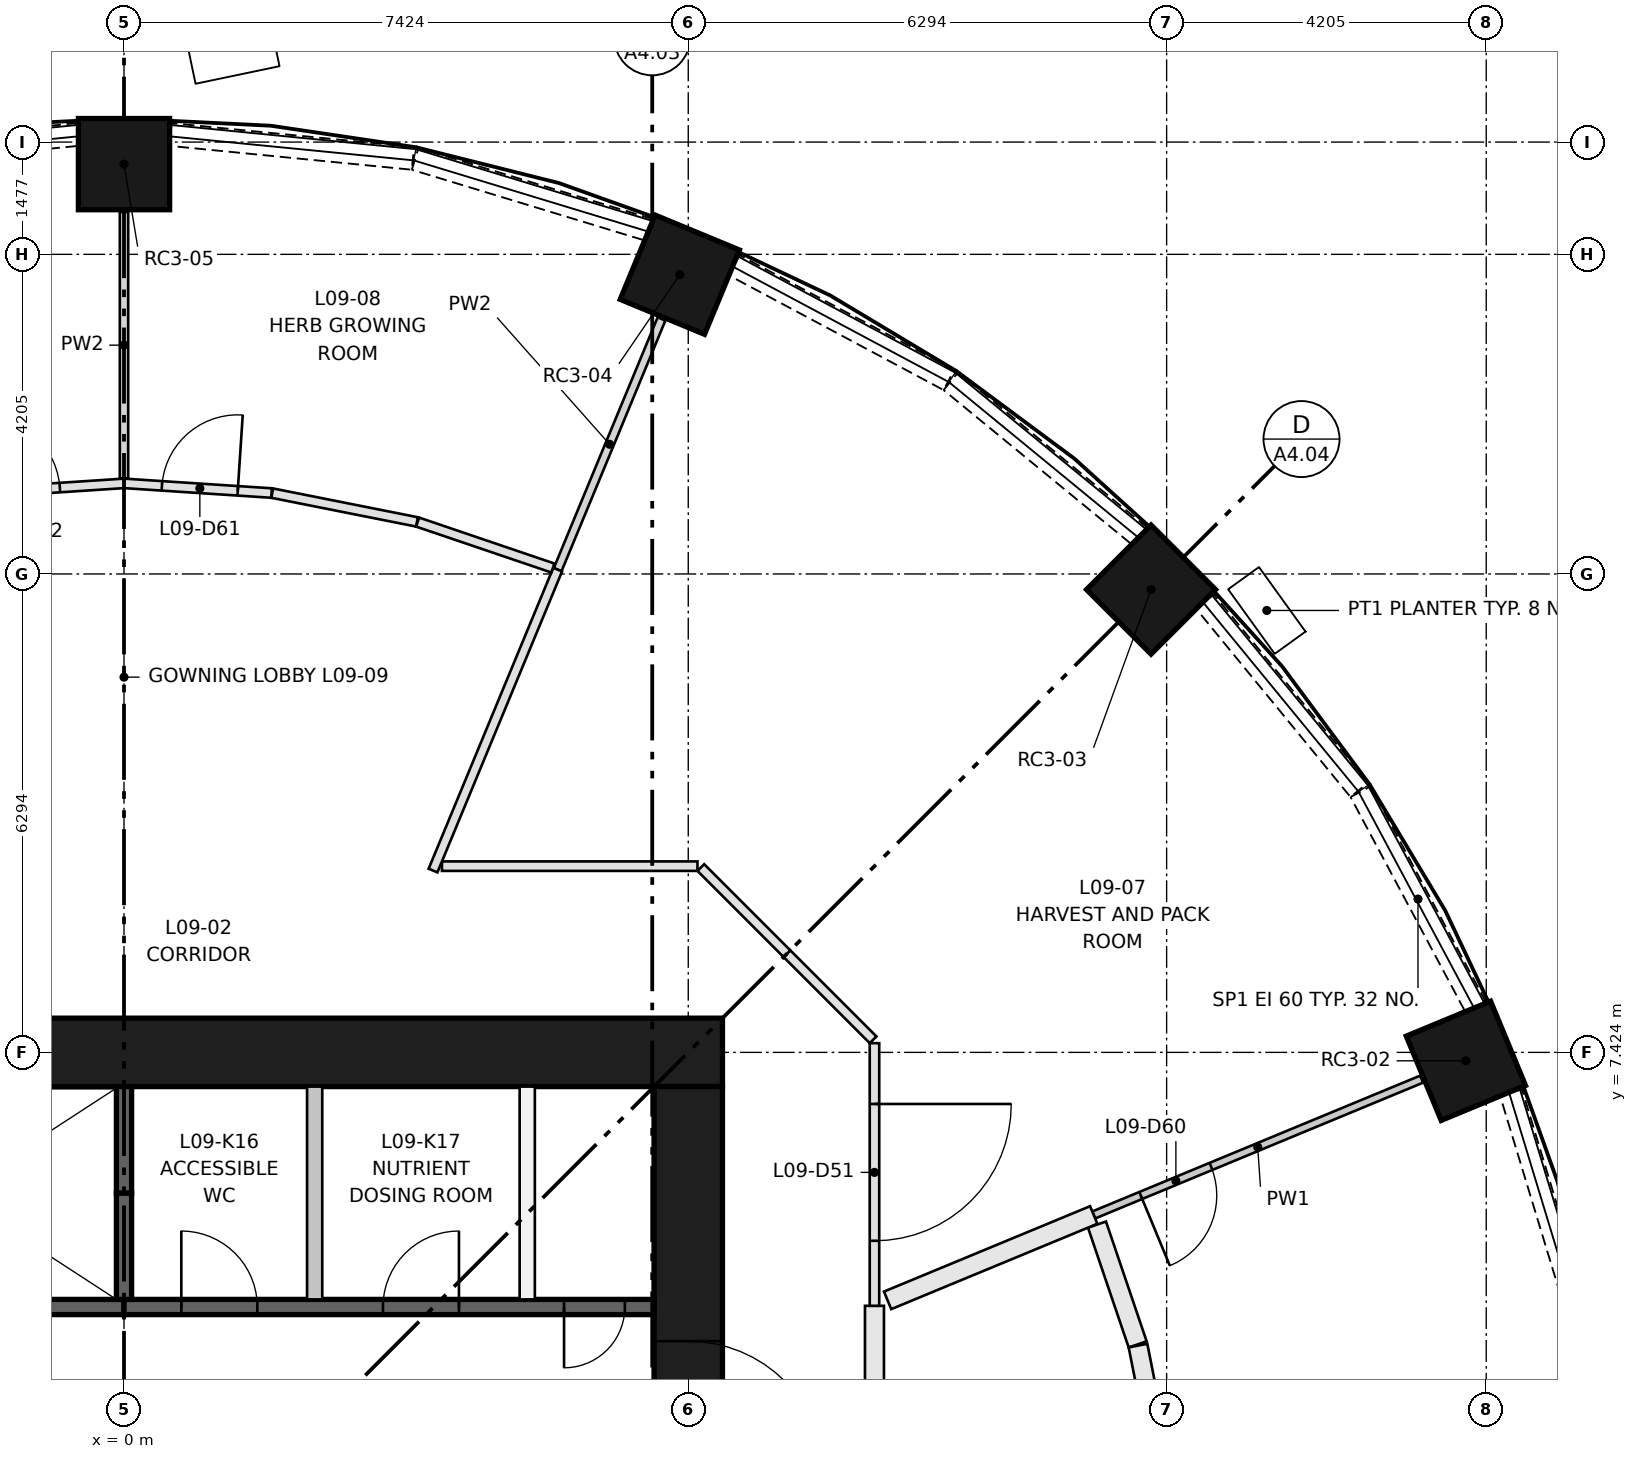
"""IFC4 building model, lengths in metres.
Left out: names, types, materials, properties, quantities, classifications, styles, units other than length and angle.
Written with IfcOpenShell. Run it as: python <this file> out.ifc"""

import sys

from ifc_helpers import new_model, si_unit, direction, frame, frame_2d, origin, origin_2d, place, context, subcontext, project, spatial, rectangle, extrude, element, fill, save


model = new_model("IFC4")
c1 = context("Model", 3, precision=1e-05, world=origin(), true_north=direction((0.0, 1.0)))
c2 = subcontext(c1, "Body", "Model", "MODEL_VIEW")
j1 = project(units=[si_unit("LENGTHUNIT", "METRE"), si_unit("PLANEANGLEUNIT", "RADIAN")], contexts=[c1])
p1 = place(None, origin())
s1 = spatial("IfcSite", under=j1, at=p1, CompositionType="ELEMENT")
p2 = place(p1, origin())
s2 = spatial("IfcBuilding", under=s1, at=p2, CompositionType="ELEMENT")
p3 = place(p2, frame((0.0, 0.0, 37.15)))
s3 = spatial("IfcBuildingStorey", under=s2, at=p3, CompositionType="ELEMENT", Elevation=37.15)
for number, where, z_axis, x_axis in (
    (1, (17.655, 7.313, 0.0), (0.0, 0.0, 1.0), (0.924, 0.383, 0.0)),
    (2, (13.513, 13.513, 0.0), (0.0, 0.0, 1.0), (0.707, 0.707, 0.0)),
    (3, (7.313, 17.655, 0.0), (0.0, 0.0, 1.0), (0.383, 0.924, 0.0)),
    (4, (0.0, 19.11, 0.0), (0.0, 0.0, 1.0), (0.0, 1.0, 0.0)),
):
    element("IfcColumn", number, at=place(p3, frame(where, z_axis=z_axis, x_axis=x_axis)), inside=s3, PredefinedType="COLUMN", context=c2, shape_type="SweptSolid", body=[
        extrude(rectangle(XDim=1.2, YDim=1.2, at=origin_2d()), origin(), (0.0, 0.0, 1.0), 3.65),
    ])
p4 = place(p3, frame((-7.874, 7.424, 0.0), z_axis=(0.0, 0.0, 1.0), x_axis=(1.0, 0.0, 0.0)))
e5 = element("IfcWall", 5, at=p4, inside=s3, PredefinedType="SHEAR", context=c2, shape_type="SweptSolid", body=[
    extrude(rectangle(XDim=15.748, YDim=0.9, at=frame_2d((7.874, 0.0))), origin(), (0.0, 0.0, 1.0), 3.65),
])
p5 = place(p3, frame((7.424, -6.974, 0.0), z_axis=(0.0, 0.0, 1.0), x_axis=(0.0, 1.0, 0.0)))
e6 = element("IfcWall", 6, at=p5, inside=s3, PredefinedType="SHEAR", context=c2, shape_type="SweptSolid", body=[
    extrude(rectangle(XDim=13.948, YDim=0.9, at=frame_2d((6.974, 0.0))), origin(), (0.0, 0.0, 1.0), 3.65),
])
p6 = place(p5, frame((6.474, 0.0, 0.0)))
e7 = element("IfcOpeningElement", 7, at=p6, cuts=e6, PredefinedType="OPENING", context=c2, shape_type="SweptSolid", body=[
    extrude(rectangle(XDim=1.0, YDim=2.1, at=frame_2d((0.5, 1.05))), frame((0.0, 0.46, 0.0), z_axis=(0.0, -1.0, 0.0), x_axis=(1.0, 0.0, 0.0)), (0.0, 0.0, 1.0), 0.92),
])
p7 = place(p5, frame((3.35, 0.0, 0.0)))
e8 = element("IfcOpeningElement", 8, at=p7, cuts=e6, PredefinedType="OPENING", context=c2, shape_type="SweptSolid", body=[
    extrude(rectangle(XDim=1.8, YDim=2.1, at=frame_2d((0.9, 1.05))), frame((0.0, 0.46, 0.0), z_axis=(0.0, -1.0, 0.0), x_axis=(1.0, 0.0, 0.0)), (0.0, 0.0, 1.0), 0.92),
])
p8 = place(p5, frame((8.799, 0.0, 0.0)))
e9 = element("IfcOpeningElement", 9, at=p8, cuts=e6, PredefinedType="OPENING", context=c2, shape_type="SweptSolid", body=[
    extrude(rectangle(XDim=1.8, YDim=2.1, at=frame_2d((0.9, 1.05))), frame((0.0, 0.46, 0.0), z_axis=(0.0, -1.0, 0.0), x_axis=(1.0, 0.0, 0.0)), (0.0, 0.0, 1.0), 0.92),
])
p9 = place(p3, frame((-6.974, 4.074, 0.0), z_axis=(0.0, 0.0, 1.0), x_axis=(1.0, 0.0, 0.0)))
e10 = element("IfcWall", 10, at=p9, inside=s3, PredefinedType="SHEAR", context=c2, shape_type="SweptSolid", body=[
    extrude(rectangle(XDim=6.974, YDim=0.2, at=frame_2d((3.487, 0.0))), origin(), (0.0, 0.0, 1.0), 3.3),
])
p10 = place(p3, frame((0.0, 4.074, 0.0), z_axis=(0.0, 0.0, 1.0), x_axis=(1.0, 0.0, 0.0)))
e11 = element("IfcWall", 11, at=p10, inside=s3, PredefinedType="SHEAR", context=c2, shape_type="SweptSolid", body=[
    extrude(rectangle(XDim=6.974, YDim=0.2, at=frame_2d((3.487, 0.0))), origin(), (0.0, 0.0, 1.0), 3.3),
])
p11 = place(p10, frame((0.754, 0.0, 0.0)))
e12 = element("IfcOpeningElement", 12, at=p11, cuts=e11, PredefinedType="OPENING", context=c2, shape_type="SweptSolid", body=[
    extrude(rectangle(XDim=1.0, YDim=2.1, at=frame_2d((0.5, 1.05))), frame((0.0, 0.11, 0.0), z_axis=(0.0, -1.0, 0.0), x_axis=(1.0, 0.0, 0.0)), (0.0, 0.0, 1.0), 0.22),
])
p12 = place(p10, frame((3.407, 0.0, 0.0)))
e13 = element("IfcOpeningElement", 13, at=p12, cuts=e11, PredefinedType="OPENING", context=c2, shape_type="SweptSolid", body=[
    extrude(rectangle(XDim=1.0, YDim=2.1, at=frame_2d((0.5, 1.05))), frame((0.0, 0.11, 0.0), z_axis=(0.0, -1.0, 0.0), x_axis=(1.0, 0.0, 0.0)), (0.0, 0.0, 1.0), 0.22),
])
p13 = place(p10, frame((5.79, 0.0, 0.0)))
e14 = element("IfcOpeningElement", 14, at=p13, cuts=e11, PredefinedType="OPENING", context=c2, shape_type="SweptSolid", body=[
    extrude(rectangle(XDim=0.8, YDim=2.1, at=frame_2d((0.4, 1.05))), frame((0.0, 0.11, 0.0), z_axis=(0.0, -1.0, 0.0), x_axis=(1.0, 0.0, 0.0)), (0.0, 0.0, 1.0), 0.22),
])
p14 = place(p3, frame((0.0, 4.174, 0.0), z_axis=(0.0, 0.0, 1.0), x_axis=(0.0, 1.0, 0.0)))
e15 = element("IfcWall", 15, at=p14, inside=s3, PredefinedType="SHEAR", context=c2, shape_type="SweptSolid", body=[
    extrude(rectangle(XDim=1.4, YDim=0.2, at=frame_2d((0.7, 0.0))), origin(), (0.0, 0.0, 1.0), 3.3),
])
p15 = place(p3, frame((0.0, 5.574, 0.0), z_axis=(0.0, 0.0, 1.0), x_axis=(0.0, 1.0, 0.0)))
e16 = element("IfcWall", 16, at=p15, inside=s3, PredefinedType="SHEAR", context=c2, shape_type="SweptSolid", body=[
    extrude(rectangle(XDim=1.4, YDim=0.2, at=frame_2d((0.7, 0.0))), origin(), (0.0, 0.0, 1.0), 3.3),
])
for number, where, z_axis, x_axis in (
    (17, (2.509, 4.174, 0.0), (0.0, 0.0, 1.0), (0.0, 1.0, 0.0)),
    (18, (5.305, 4.174, 0.0), (0.0, 0.0, 1.0), (0.0, 1.0, 0.0)),
):
    element("IfcWall", number, at=place(p3, frame(where, z_axis=z_axis, x_axis=x_axis)), inside=s3, PredefinedType="PARTITIONING", context=c2, shape_type="SweptSolid", body=[
        extrude(rectangle(XDim=2.8, YDim=0.2, at=frame_2d((1.4, 0.0))), origin(), (0.0, 0.0, 1.0), 3.3),
    ])
p16 = place(p3, frame((19.18, 3.83, 0.0), z_axis=(0.0, 0.0, 1.0), x_axis=(-0.290472877795, 0.956883225512, 0.0)))
e19 = element("IfcWall", 19, at=p16, inside=s3, PredefinedType="SOLIDWALL", context=c2, shape_type="SweptSolid", body=[
    extrude(rectangle(XDim=3.202, YDim=0.3, at=frame_2d((1.601, 0.0))), origin(), (0.0, 0.0, 1.0), 0.9),
])
p17 = place(p3, frame((17.78, 8.028, 0.0), z_axis=(0.0, 0.0, 1.0), x_axis=(-0.471284265614, 0.881981372243, 0.0)))
e20 = element("IfcWall", 20, at=p17, inside=s3, PredefinedType="SOLIDWALL", context=c2, shape_type="SweptSolid", body=[
    extrude(rectangle(XDim=3.204, YDim=0.3, at=frame_2d((1.602, 0.0))), origin(), (0.0, 0.0, 1.0), 0.9),
])
for number, where, z_axis, x_axis in (
    (21, (16.253, 10.879, 0.0), (0.0, 0.0, 1.0), (-0.634, 0.773, 0.0)),
    (22, (13.354, 14.222, 0.0), (0.0, 0.0, 1.0), (-0.773, 0.634, 0.0)),
):
    element("IfcWall", number, at=place(p3, frame(where, z_axis=z_axis, x_axis=x_axis)), inside=s3, PredefinedType="SOLIDWALL", context=c2, shape_type="SweptSolid", body=[
        extrude(rectangle(XDim=3.202, YDim=0.3, at=frame_2d((1.601, 0.0))), origin(), (0.0, 0.0, 1.0), 0.9),
    ])
p18 = place(p3, frame((10.854, 16.27, 0.0), z_axis=(0.0, 0.0, 1.0), x_axis=(-0.881981372243, 0.471284265614, 0.0)))
e23 = element("IfcWall", 23, at=p18, inside=s3, PredefinedType="SOLIDWALL", context=c2, shape_type="SweptSolid", body=[
    extrude(rectangle(XDim=3.204, YDim=0.3, at=frame_2d((1.602, 0.0))), origin(), (0.0, 0.0, 1.0), 0.9),
])
p19 = place(p3, frame((6.895, 18.25, 0.0), z_axis=(0.0, 0.0, 1.0), x_axis=(-0.956883225512, 0.290472877795, 0.0)))
e24 = element("IfcWall", 24, at=p19, inside=s3, PredefinedType="SOLIDWALL", context=c2, shape_type="SweptSolid", body=[
    extrude(rectangle(XDim=3.202, YDim=0.3, at=frame_2d((1.601, 0.0))), origin(), (0.0, 0.0, 1.0), 0.9),
])
for number, where, z_axis, x_axis in (
    (25, (3.801, 19.186, 0.0), (0.0, 0.0, 1.0), (-0.995, 0.098, 0.0)),
    (26, (-0.613, 19.5, 0.0), (0.0, 0.0, 1.0), (-0.995, -0.098, 0.0)),
):
    element("IfcWall", number, at=place(p3, frame(where, z_axis=z_axis, x_axis=x_axis)), inside=s3, PredefinedType="SOLIDWALL", context=c2, shape_type="SweptSolid", body=[
        extrude(rectangle(XDim=3.204, YDim=0.3, at=frame_2d((1.602, 0.0))), origin(), (0.0, 0.0, 1.0), 0.9),
    ])
p20 = place(p3, frame((9.874, 4.09, 0.0), z_axis=(0.0, 0.0, 1.0), x_axis=(0.0, -1.0, 0.0)))
e27 = element("IfcWall", 27, at=p20, inside=s3, PredefinedType="PARTITIONING", context=c2, shape_type="SweptSolid", body=[
    extrude(rectangle(XDim=4.09, YDim=0.25, at=frame_2d((2.045, 0.0))), origin(), (0.0, 0.0, 1.0), 3.3),
])
p21 = place(p20, frame((1.5, 0.0, 0.0)))
e28 = element("IfcOpeningElement", 28, at=p21, cuts=e27, PredefinedType="OPENING", context=c2, shape_type="SweptSolid", body=[
    extrude(rectangle(XDim=1.0, YDim=2.1, at=frame_2d((0.5, 1.05))), frame((0.0, 0.135, 0.0), z_axis=(0.0, -1.0, 0.0), x_axis=(1.0, 0.0, 0.0)), (0.0, 0.0, 1.0), 0.27),
])
p22 = place(p3, frame((8.722, 8.722, 0.0), z_axis=(0.0, 0.0, 1.0), x_axis=(0.70718294931, -0.707030604857, 0.0)))
e29 = element("IfcWall", 29, at=p22, inside=s3, PredefinedType="PARTITIONING", context=c2, shape_type="SweptSolid", body=[
    extrude(rectangle(XDim=1.603, YDim=0.125, at=frame_2d((0.801, 0.0))), origin(), (0.0, 0.0, 1.0), 3.3),
])
p23 = place(p3, frame((9.874, 7.545, 0.0), z_axis=(0.0, 0.0, 1.0), x_axis=(0.0, -1.0, 0.0)))
e30 = element("IfcWall", 30, at=p23, inside=s3, PredefinedType="PARTITIONING", context=c2, shape_type="SweptSolid", body=[
    extrude(rectangle(XDim=3.455, YDim=0.125, at=frame_2d((1.728, 0.0))), origin(), (0.0, 0.0, 1.0), 3.3),
])
p24 = place(p23, frame((0.8, 0.0, 0.0)))
e31 = element("IfcOpeningElement", 31, at=p24, cuts=e30, PredefinedType="OPENING", context=c2, shape_type="SweptSolid", body=[
    extrude(rectangle(XDim=1.8, YDim=2.1, at=frame_2d((0.9, 1.05))), frame((0.0, 0.073, 0.0), z_axis=(0.0, -1.0, 0.0), x_axis=(1.0, 0.0, 0.0)), (0.0, 0.0, 1.0), 0.145),
])
p25 = place(p3, frame((4.183, 9.874, 0.0), z_axis=(0.0, 0.0, 1.0), x_axis=(1.0, 0.0, 0.0)))
e32 = element("IfcWall", 32, at=p25, inside=s3, PredefinedType="PARTITIONING", context=c2, shape_type="SweptSolid", body=[
    extrude(rectangle(XDim=3.362, YDim=0.125, at=frame_2d((1.681, 0.0))), origin(), (0.0, 0.0, 1.0), 3.3),
])
p26 = place(p3, frame((7.589, 9.856, 0.0), z_axis=(0.0, 0.0, 1.0), x_axis=(0.707030604857, -0.70718294931, 0.0)))
e33 = element("IfcWall", 33, at=p26, inside=s3, PredefinedType="PARTITIONING", context=c2, shape_type="SweptSolid", body=[
    extrude(rectangle(XDim=1.603, YDim=0.125, at=frame_2d((0.801, 0.0))), origin(), (0.0, 0.0, 1.0), 3.3),
])
p27 = place(p3, frame((13.337, 3.582, 0.0), z_axis=(0.0, 0.0, 1.0), x_axis=(-0.321458381335, 0.946923708157, 0.0)))
e34 = element("IfcWall", 34, at=p27, inside=s3, PredefinedType="PARTITIONING", context=c2, shape_type="SweptSolid", body=[
    extrude(rectangle(XDim=1.665, YDim=0.25, at=frame_2d((0.833, 0.0))), origin(), (0.0, 0.0, 1.0), 3.3),
])
p28 = place(p3, frame((13.69, 1.811, 0.0), z_axis=(0.0, 0.0, 1.0), x_axis=(-0.195014530736, 0.980800353182, 0.0)))
e35 = element("IfcWall", 35, at=p28, inside=s3, PredefinedType="PARTITIONING", context=c2, shape_type="SweptSolid", body=[
    extrude(rectangle(XDim=1.79, YDim=0.25, at=frame_2d((0.895, 0.0))), origin(), (0.0, 0.0, 1.0), 3.3),
])
p29 = place(p3, frame((17.073, 7.072, 0.0), z_axis=(0.0, 0.0, 1.0), x_axis=(-0.92387920118, -0.382684232268, 0.0)))
e36 = element("IfcWall", 36, at=p29, inside=s3, PredefinedType="PARTITIONING", context=c2, shape_type="SweptSolid", body=[
    extrude(rectangle(XDim=4.67, YDim=0.1, at=frame_2d((2.335, 0.0))), origin(), (0.0, 0.0, 1.0), 3.3),
])
p30 = place(p29, frame((3.0, 0.0, 0.0)))
e37 = element("IfcOpeningElement", 37, at=p30, cuts=e36, PredefinedType="OPENING", context=c2, shape_type="SweptSolid", body=[
    extrude(rectangle(XDim=1.0, YDim=2.1, at=frame_2d((0.5, 1.05))), frame((0.0, 0.06, 0.0), z_axis=(0.0, -1.0, 0.0), x_axis=(1.0, 0.0, 0.0)), (0.0, 0.0, 1.0), 0.12),
])
p31 = place(p3, frame((10.047, 4.162, 0.0), z_axis=(0.0, 0.0, 1.0), x_axis=(0.92388200997, 0.382677451195, 0.0)))
e38 = element("IfcWall", 38, at=p31, inside=s3, PredefinedType="PARTITIONING", context=c2, shape_type="SweptSolid", body=[
    extrude(rectangle(XDim=2.935, YDim=0.25, at=frame_2d((1.468, 0.0))), origin(), (0.0, 0.0, 1.0), 3.3),
])
p32 = place(p3, frame((5.706, 13.775, 0.0), z_axis=(0.0, 0.0, 1.0), x_axis=(0.382706138858, 0.923870126847, 0.0)))
e39 = element("IfcWall", 39, at=p32, inside=s3, PredefinedType="PARTITIONING", context=c2, shape_type="SweptSolid", body=[
    extrude(rectangle(XDim=3.57, YDim=0.11, at=frame_2d((1.785, 0.0))), origin(), (0.0, 0.0, 1.0), 3.3),
])
p33 = place(p3, frame((4.066, 9.816, 0.0), z_axis=(0.0, 0.0, 1.0), x_axis=(0.382709065586, 0.923868914467, 0.0)))
e40 = element("IfcWall", 40, at=p33, inside=s3, PredefinedType="PARTITIONING", context=c2, shape_type="SweptSolid", body=[
    extrude(rectangle(XDim=4.285, YDim=0.125, at=frame_2d((2.143, 0.0))), origin(), (0.0, 0.0, 1.0), 3.3),
])
p34 = place(p3, frame((0.0, 14.91, 0.0), z_axis=(0.0, 0.0, 1.0), x_axis=(0.997861646388, -0.065361568741, 0.0)))
e41 = element("IfcWall", 41, at=p34, inside=s3, PredefinedType="PARTITIONING", context=c2, shape_type="SweptSolid", body=[
    extrude(rectangle(XDim=1.946, YDim=0.125, at=frame_2d((0.973, 0.0))), origin(), (0.0, 0.0, 1.0), 3.3),
])
p35 = place(p34, frame((0.5, 0.0, 0.0)))
e42 = element("IfcOpeningElement", 42, at=p35, cuts=e41, PredefinedType="OPENING", context=c2, shape_type="SweptSolid", body=[
    extrude(rectangle(XDim=1.0, YDim=2.1, at=frame_2d((0.5, 1.05))), frame((0.0, 0.073, 0.0), z_axis=(0.0, -1.0, 0.0), x_axis=(1.0, 0.0, 0.0)), (0.0, 0.0, 1.0), 0.145),
])
p36 = place(p3, frame((3.855, 14.403, 0.0), z_axis=(0.0, 0.0, 1.0), x_axis=(-0.980807266515, 0.194979757801, 0.0)))
e43 = element("IfcWall", 43, at=p36, inside=s3, PredefinedType="PARTITIONING", context=c2, shape_type="SweptSolid", body=[
    extrude(rectangle(XDim=1.942, YDim=0.125, at=frame_2d((0.971, 0.0))), origin(), (0.0, 0.0, 1.0), 3.3),
])
p37 = place(p3, frame((5.643, 13.796, 0.0), z_axis=(0.0, 0.0, 1.0), x_axis=(-0.946915165682, 0.321483543904, 0.0)))
e44 = element("IfcWall", 44, at=p37, inside=s3, PredefinedType="PARTITIONING", context=c2, shape_type="SweptSolid", body=[
    extrude(rectangle(XDim=1.88, YDim=0.125, at=frame_2d((0.94, 0.0))), origin(), (0.0, 0.0, 1.0), 3.3),
])
p38 = place(p3, frame((0.0, 14.976, 0.0), z_axis=(0.0, 0.0, 1.0), x_axis=(0.0, 1.0, 0.0)))
e45 = element("IfcWall", 45, at=p38, inside=s3, PredefinedType="PARTITIONING", context=c2, shape_type="SweptSolid", body=[
    extrude(rectangle(XDim=3.504, YDim=0.11, at=frame_2d((1.752, 0.0))), origin(), (0.0, 0.0, 1.0), 3.3),
])
p39 = place(p3, frame((-1.942, 14.783, 0.0), z_axis=(0.0, 0.0, 1.0), x_axis=(0.997861646388, 0.065361568741, 0.0)))
e46 = element("IfcWall", 46, at=p39, inside=s3, PredefinedType="PARTITIONING", context=c2, shape_type="SweptSolid", body=[
    extrude(rectangle(XDim=1.946, YDim=0.125, at=frame_2d((0.973, 0.0))), origin(), (0.0, 0.0, 1.0), 3.3),
])
p40 = place(p39, frame((0.1, 0.0, 0.0)))
e47 = element("IfcOpeningElement", 47, at=p40, cuts=e46, PredefinedType="OPENING", context=c2, shape_type="SweptSolid", body=[
    extrude(rectangle(XDim=1.0, YDim=2.1, at=frame_2d((0.5, 1.05))), frame((0.0, 0.073, 0.0), z_axis=(0.0, -1.0, 0.0), x_axis=(1.0, 0.0, 0.0)), (0.0, 0.0, 1.0), 0.145),
])
p41 = place(p11, origin())
e48 = element("IfcDoor", 48, at=p41, inside=s3, OperationType="SINGLE_SWING_LEFT", PredefinedType="DOOR", context=c2, shape_type="SweptSolid", body=[
    extrude(rectangle(XDim=1.0, YDim=2.1, at=frame_2d((0.5, 1.05))), frame((0.0, 0.025, 0.0), z_axis=(0.0, -1.0, 0.0), x_axis=(1.0, 0.0, 0.0)), (0.0, 0.0, 1.0), 0.05),
])
fill(e12, e48)
p42 = place(p12, origin())
e49 = element("IfcDoor", 49, at=p42, inside=s3, OperationType="SINGLE_SWING_RIGHT", PredefinedType="DOOR", context=c2, shape_type="SweptSolid", body=[
    extrude(rectangle(XDim=1.0, YDim=2.1, at=frame_2d((0.5, 1.05))), frame((0.0, 0.025, 0.0), z_axis=(0.0, -1.0, 0.0), x_axis=(1.0, 0.0, 0.0)), (0.0, 0.0, 1.0), 0.05),
])
fill(e13, e49)
p43 = place(p13, frame((0.8, 0.0, 0.0), z_axis=(0.0, 0.0, 1.0), x_axis=(-1.0, 0.0, 0.0)))
e50 = element("IfcDoor", 50, at=p43, inside=s3, OperationType="SINGLE_SWING_LEFT", PredefinedType="DOOR", context=c2, shape_type="SweptSolid", body=[
    extrude(rectangle(XDim=0.8, YDim=2.1, at=frame_2d((0.4, 1.05))), frame((0.0, 0.025, 0.0), z_axis=(0.0, -1.0, 0.0), x_axis=(1.0, 0.0, 0.0)), (0.0, 0.0, 1.0), 0.05),
])
fill(e14, e50)
p44 = place(p8, frame((1.8, 0.0, 0.0), z_axis=(0.0, 0.0, 1.0), x_axis=(-1.0, 0.0, 0.0)))
e51 = element("IfcDoor", 51, at=p44, inside=s3, OperationType="DOUBLE_DOOR_SINGLE_SWING", PredefinedType="DOOR", context=c2, shape_type="SweptSolid", body=[
    extrude(rectangle(XDim=1.8, YDim=2.1, at=frame_2d((0.9, 1.05))), frame((0.0, 0.025, 0.0), z_axis=(0.0, -1.0, 0.0), x_axis=(1.0, 0.0, 0.0)), (0.0, 0.0, 1.0), 0.05),
])
fill(e9, e51)
p45 = place(p24, origin())
e52 = element("IfcDoor", 52, at=p45, inside=s3, OperationType="DOUBLE_DOOR_SINGLE_SWING", PredefinedType="DOOR", context=c2, shape_type="SweptSolid", body=[
    extrude(rectangle(XDim=1.8, YDim=2.1, at=frame_2d((0.9, 1.05))), frame((0.0, 0.025, 0.0), z_axis=(0.0, -1.0, 0.0), x_axis=(1.0, 0.0, 0.0)), (0.0, 0.0, 1.0), 0.05),
])
fill(e31, e52)
p46 = place(p30, origin())
e53 = element("IfcDoor", 53, at=p46, inside=s3, OperationType="SINGLE_SWING_RIGHT", PredefinedType="DOOR", context=c2, shape_type="SweptSolid", body=[
    extrude(rectangle(XDim=1.0, YDim=2.1, at=frame_2d((0.5, 1.05))), frame((0.0, 0.025, 0.0), z_axis=(0.0, -1.0, 0.0), x_axis=(1.0, 0.0, 0.0)), (0.0, 0.0, 1.0), 0.05),
])
fill(e37, e53)
p47 = place(p35, origin())
e54 = element("IfcDoor", 54, at=p47, inside=s3, OperationType="SINGLE_SWING_RIGHT", PredefinedType="DOOR", context=c2, shape_type="SweptSolid", body=[
    extrude(rectangle(XDim=1.0, YDim=2.1, at=frame_2d((0.5, 1.05))), frame((0.0, 0.025, 0.0), z_axis=(0.0, -1.0, 0.0), x_axis=(1.0, 0.0, 0.0)), (0.0, 0.0, 1.0), 0.05),
])
fill(e42, e54)
p48 = place(p40, origin())
e55 = element("IfcDoor", 55, at=p48, inside=s3, OperationType="SINGLE_SWING_LEFT", PredefinedType="DOOR", context=c2, shape_type="SweptSolid", body=[
    extrude(rectangle(XDim=1.0, YDim=2.1, at=frame_2d((0.5, 1.05))), frame((0.0, 0.025, 0.0), z_axis=(0.0, -1.0, 0.0), x_axis=(1.0, 0.0, 0.0)), (0.0, 0.0, 1.0), 0.05),
])
fill(e47, e55)
save(model, sys.argv[1])
